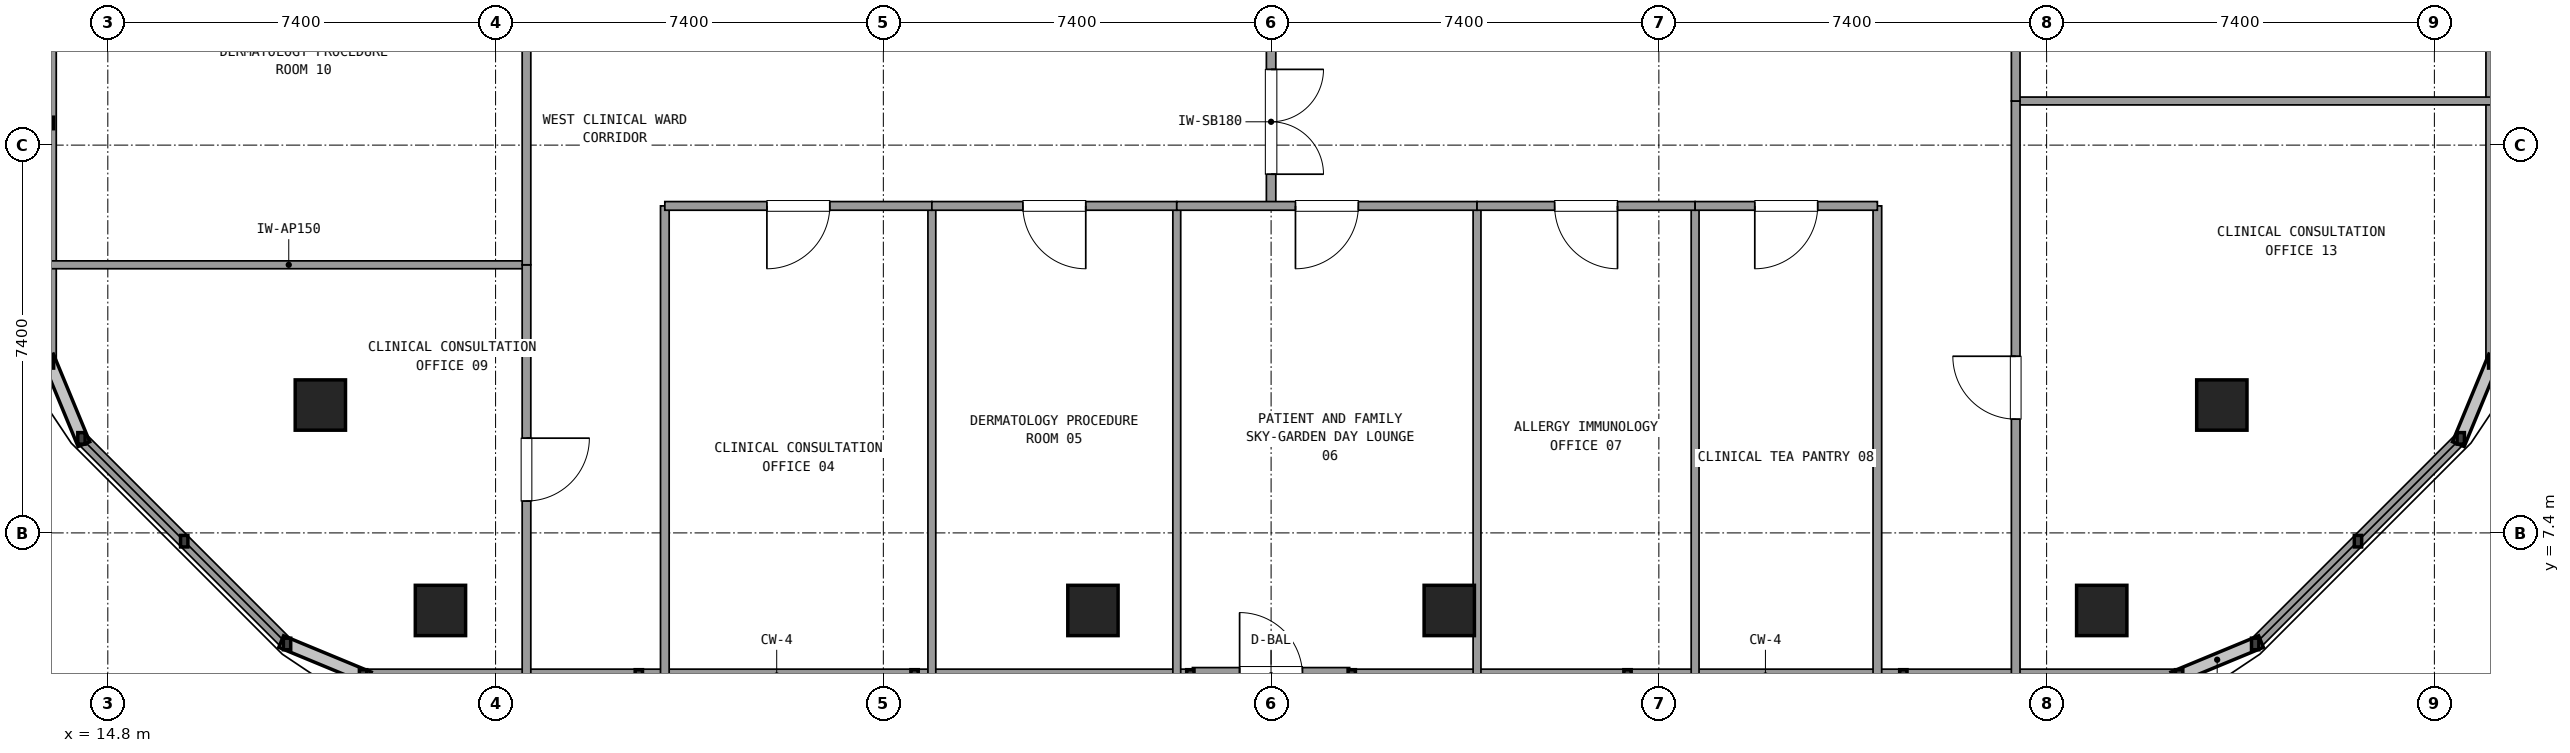
"""IFC4 building model, lengths in metres.
Left out: names, types, materials, properties, quantities, classifications, styles, units other than length and angle.
Written with IfcOpenShell. Run it as: python <this file> out.ifc"""

import sys

from ifc_helpers import new_model, si_unit, direction, frame, frame_2d, origin, origin_2d, place, context, subcontext, project, spatial, rectangle, extrude, element, fill, save


model = new_model("IFC4")
c1 = context("Model", 3, precision=1e-05, world=origin(), true_north=direction((0.0, 1.0)))
c2 = subcontext(c1, "Body", "Model", "MODEL_VIEW")
j1 = project(units=[si_unit("LENGTHUNIT", "METRE"), si_unit("PLANEANGLEUNIT", "RADIAN")], contexts=[c1])
p1 = place(None, origin())
s1 = spatial("IfcSite", under=j1, at=p1, CompositionType="ELEMENT")
p2 = place(p1, origin())
s2 = spatial("IfcBuilding", under=s1, at=p2, CompositionType="ELEMENT")
p3 = place(p2, frame((0.0, 0.0, 149.22)))
s3 = spatial("IfcBuildingStorey", under=s2, at=p3, CompositionType="ELEMENT", Elevation=149.22)
for number, where, z_axis, x_axis in (
    (1, (18.856, 9.84, 0.0), (0.0, 0.0, 1.0), (1.0, 0.0, 0.0)),
    (2, (21.148, 5.92, 0.0), (0.0, 0.0, 1.0), (1.0, 0.0, 0.0)),
    (3, (33.6, 5.92, 0.0), (0.0, 0.0, 1.0), (1.0, 0.0, 0.0)),
    (4, (40.4, 5.92, 0.0), (0.0, 0.0, 1.0), (1.0, 0.0, 0.0)),
    (5, (52.852, 5.92, 0.0), (0.0, 0.0, 1.0), (1.0, 0.0, 0.0)),
    (6, (55.144, 9.84, 0.0), (0.0, 0.0, 1.0), (1.0, 0.0, 0.0)),
):
    element("IfcColumn", number, at=place(p3, frame(where, z_axis=z_axis, x_axis=x_axis)), inside=s3, PredefinedType="COLUMN", context=c2, shape_type="SweptSolid", body=[
        extrude(rectangle(XDim=0.96, YDim=0.96, at=origin_2d()), origin(), (0.0, 0.0, 1.0), 3.6),
    ])
p4 = place(p3, frame((35.499, 4.68, 0.0), z_axis=(0.0, 0.0, 1.0), x_axis=(1.0, 0.0, 0.0)))
e7 = element("IfcWall", 7, at=p4, inside=s3, PredefinedType="SOLIDWALL", context=c2, shape_type="SweptSolid", body=[
    extrude(rectangle(XDim=3.0, YDim=0.3, at=frame_2d((1.5, 0.0))), origin(), (0.0, 0.0, 1.0), 2.67),
])
p5 = place(p4, frame((0.9, 0.0, 0.0)))
e8 = element("IfcOpeningElement", 8, at=p5, cuts=e7, PredefinedType="OPENING", context=c2, shape_type="SweptSolid", body=[
    extrude(rectangle(XDim=1.2, YDim=2.2, at=frame_2d((0.6, 1.1))), frame((0.0, 0.16, 0.0), z_axis=(0.0, -1.0, 0.0), x_axis=(1.0, 0.0, 0.0)), (0.0, 0.0, 1.0), 0.32),
])
p6 = place(p3, frame((19.671, 4.68, 0.0), z_axis=(0.0, 0.0, 1.0), x_axis=(1.0, 0.0, 0.0)))
e9 = element("IfcWall", 9, at=p6, inside=s3, PredefinedType="SOLIDWALL", context=c2, shape_type="SweptSolid", body=[
    extrude(rectangle(XDim=15.788, YDim=0.24, at=frame_2d((7.894, 0.0))), origin(), (0.0, 0.0, 1.0), 0.85),
])
p7 = place(p3, frame((38.539, 4.68, 0.0), z_axis=(0.0, 0.0, 1.0), x_axis=(1.0, 0.0, 0.0)))
e10 = element("IfcWall", 10, at=p7, inside=s3, PredefinedType="SOLIDWALL", context=c2, shape_type="SweptSolid", body=[
    extrude(rectangle(XDim=15.79, YDim=0.24, at=frame_2d((7.895, 0.0))), origin(), (0.0, 0.0, 1.0), 0.85),
])
p8 = place(p3, frame((55.78, 5.281, 0.0), z_axis=(0.0, 0.0, 1.0), x_axis=(0.707084777957, 0.707128783731, 0.0)))
e11 = element("IfcWall", 11, at=p8, inside=s3, PredefinedType="SOLIDWALL", context=c2, shape_type="SweptSolid", body=[
    extrude(rectangle(XDim=5.548, YDim=0.24, at=frame_2d((2.774, 0.0))), origin(), (0.0, 0.0, 1.0), 0.85),
])
p9 = place(p3, frame((60.304, 10.655, 0.0), z_axis=(0.0, 0.0, 1.0), x_axis=(0.0, 1.0, 0.0)))
e12 = element("IfcWall", 12, at=p9, inside=s3, PredefinedType="SOLIDWALL", context=c2, shape_type="SweptSolid", body=[
    extrude(rectangle(XDim=30.49, YDim=0.24, at=frame_2d((15.245, 0.0))), origin(), (0.0, 0.0, 1.0), 0.85),
])
p10 = place(p3, frame((13.696, 24.36, 0.0), z_axis=(0.0, 0.0, 1.0), x_axis=(0.0, -1.0, 0.0)))
e13 = element("IfcWall", 13, at=p10, inside=s3, PredefinedType="SOLIDWALL", context=c2, shape_type="SweptSolid", body=[
    extrude(rectangle(XDim=13.705, YDim=0.24, at=frame_2d((6.853, 0.0))), origin(), (0.0, 0.0, 1.0), 0.85),
])
p11 = place(p3, frame((14.297, 9.204, 0.0), z_axis=(0.0, 0.0, 1.0), x_axis=(0.707084777957, -0.707128783731, 0.0)))
e14 = element("IfcWall", 14, at=p11, inside=s3, PredefinedType="SOLIDWALL", context=c2, shape_type="SweptSolid", body=[
    extrude(rectangle(XDim=5.548, YDim=0.24, at=frame_2d((2.774, 0.0))), origin(), (0.0, 0.0, 1.0), 0.85),
])
p12 = place(p3, frame((37.0, 13.64, 0.0), z_axis=(0.0, 0.0, 1.0), x_axis=(0.0, 1.0, 0.0)))
e15 = element("IfcWall", 15, at=p12, inside=s3, PredefinedType="PARTITIONING", context=c2, shape_type="SweptSolid", body=[
    extrude(rectangle(XDim=3.21, YDim=0.18, at=frame_2d((1.605, 0.0))), origin(), (0.0, 0.0, 1.0), 2.61),
])
p13 = place(p12, frame((0.605, 0.0, 0.0)))
e16 = element("IfcOpeningElement", 16, at=p13, cuts=e15, PredefinedType="OPENING", context=c2, shape_type="SweptSolid", body=[
    extrude(rectangle(XDim=2.0, YDim=2.2, at=frame_2d((1.0, 1.1))), frame((0.0, 0.1, 0.0), z_axis=(0.0, -1.0, 0.0), x_axis=(1.0, 0.0, 0.0)), (0.0, 0.0, 1.0), 0.2),
])
for number, where, z_axis, x_axis in (
    (17, (25.43, 4.7, 0.0), (0.0, 0.0, 1.0), (0.0, 1.0, 0.0)),
    (18, (48.57, 4.7, 0.0), (0.0, 0.0, 1.0), (0.0, 1.0, 0.0)),
):
    element("IfcWall", number, at=place(p3, frame(where, z_axis=z_axis, x_axis=x_axis)), inside=s3, PredefinedType="PARTITIONING", context=c2, shape_type="SweptSolid", body=[
        extrude(rectangle(XDim=8.94, YDim=0.165, at=frame_2d((4.47, 0.0))), origin(), (0.0, 0.0, 1.0), 2.61),
    ])
p14 = place(p3, frame((30.526, 13.64, 0.0), z_axis=(0.0, 0.0, 1.0), x_axis=(0.0, -1.0, 0.0)))
e19 = element("IfcWall", 19, at=p14, inside=s3, PredefinedType="PARTITIONING", context=c2, shape_type="SweptSolid", body=[
    extrude(rectangle(XDim=8.94, YDim=0.15, at=frame_2d((4.47, 0.0))), origin(), (0.0, 0.0, 1.0), 2.61),
])
p15 = place(p3, frame((25.43, 13.64, 0.0), z_axis=(0.0, 0.0, 1.0), x_axis=(1.0, 0.0, 0.0)))
e20 = element("IfcWall", 20, at=p15, inside=s3, PredefinedType="PARTITIONING", context=c2, shape_type="SweptSolid", body=[
    extrude(rectangle(XDim=5.096, YDim=0.165, at=frame_2d((2.548, 0.0))), origin(), (0.0, 0.0, 1.0), 2.61),
])
p16 = place(p15, frame((1.948, 0.0, 0.0)))
e21 = element("IfcOpeningElement", 21, at=p16, cuts=e20, PredefinedType="OPENING", context=c2, shape_type="SweptSolid", body=[
    extrude(rectangle(XDim=1.2, YDim=2.15, at=frame_2d((0.6, 1.075))), frame((0.0, 0.093, 0.0), z_axis=(0.0, -1.0, 0.0), x_axis=(1.0, 0.0, 0.0)), (0.0, 0.0, 1.0), 0.185),
])
p17 = place(p3, frame((35.2, 13.64, 0.0), z_axis=(0.0, 0.0, 1.0), x_axis=(0.0, -1.0, 0.0)))
e22 = element("IfcWall", 22, at=p17, inside=s3, PredefinedType="PARTITIONING", context=c2, shape_type="SweptSolid", body=[
    extrude(rectangle(XDim=8.94, YDim=0.15, at=frame_2d((4.47, 0.0))), origin(), (0.0, 0.0, 1.0), 2.61),
])
p18 = place(p3, frame((30.526, 13.64, 0.0), z_axis=(0.0, 0.0, 1.0), x_axis=(1.0, 0.0, 0.0)))
e23 = element("IfcWall", 23, at=p18, inside=s3, PredefinedType="PARTITIONING", context=c2, shape_type="SweptSolid", body=[
    extrude(rectangle(XDim=4.674, YDim=0.165, at=frame_2d((2.337, 0.0))), origin(), (0.0, 0.0, 1.0), 2.61),
])
p19 = place(p18, frame((1.737, 0.0, 0.0)))
e24 = element("IfcOpeningElement", 24, at=p19, cuts=e23, PredefinedType="OPENING", context=c2, shape_type="SweptSolid", body=[
    extrude(rectangle(XDim=1.2, YDim=2.15, at=frame_2d((0.6, 1.075))), frame((0.0, 0.093, 0.0), z_axis=(0.0, -1.0, 0.0), x_axis=(1.0, 0.0, 0.0)), (0.0, 0.0, 1.0), 0.185),
])
p20 = place(p3, frame((40.93, 13.64, 0.0), z_axis=(0.0, 0.0, 1.0), x_axis=(0.0, -1.0, 0.0)))
e25 = element("IfcWall", 25, at=p20, inside=s3, PredefinedType="PARTITIONING", context=c2, shape_type="SweptSolid", body=[
    extrude(rectangle(XDim=8.94, YDim=0.15, at=frame_2d((4.47, 0.0))), origin(), (0.0, 0.0, 1.0), 2.61),
])
p21 = place(p3, frame((35.2, 13.64, 0.0), z_axis=(0.0, 0.0, 1.0), x_axis=(1.0, 0.0, 0.0)))
e26 = element("IfcWall", 26, at=p21, inside=s3, PredefinedType="PARTITIONING", context=c2, shape_type="SweptSolid", body=[
    extrude(rectangle(XDim=5.73, YDim=0.165, at=frame_2d((2.865, 0.0))), origin(), (0.0, 0.0, 1.0), 2.61),
])
p22 = place(p21, frame((2.265, 0.0, 0.0)))
e27 = element("IfcOpeningElement", 27, at=p22, cuts=e26, PredefinedType="OPENING", context=c2, shape_type="SweptSolid", body=[
    extrude(rectangle(XDim=1.2, YDim=2.15, at=frame_2d((0.6, 1.075))), frame((0.0, 0.093, 0.0), z_axis=(0.0, -1.0, 0.0), x_axis=(1.0, 0.0, 0.0)), (0.0, 0.0, 1.0), 0.185),
])
p23 = place(p3, frame((45.092, 13.64, 0.0), z_axis=(0.0, 0.0, 1.0), x_axis=(0.0, -1.0, 0.0)))
e28 = element("IfcWall", 28, at=p23, inside=s3, PredefinedType="PARTITIONING", context=c2, shape_type="SweptSolid", body=[
    extrude(rectangle(XDim=8.94, YDim=0.15, at=frame_2d((4.47, 0.0))), origin(), (0.0, 0.0, 1.0), 2.61),
])
p24 = place(p3, frame((40.93, 13.64, 0.0), z_axis=(0.0, 0.0, 1.0), x_axis=(1.0, 0.0, 0.0)))
e29 = element("IfcWall", 29, at=p24, inside=s3, PredefinedType="PARTITIONING", context=c2, shape_type="SweptSolid", body=[
    extrude(rectangle(XDim=4.162, YDim=0.165, at=frame_2d((2.081, 0.0))), origin(), (0.0, 0.0, 1.0), 2.61),
])
p25 = place(p24, frame((1.481, 0.0, 0.0)))
e30 = element("IfcOpeningElement", 30, at=p25, cuts=e29, PredefinedType="OPENING", context=c2, shape_type="SweptSolid", body=[
    extrude(rectangle(XDim=1.2, YDim=2.15, at=frame_2d((0.6, 1.075))), frame((0.0, 0.093, 0.0), z_axis=(0.0, -1.0, 0.0), x_axis=(1.0, 0.0, 0.0)), (0.0, 0.0, 1.0), 0.185),
])
p26 = place(p3, frame((45.092, 13.64, 0.0), z_axis=(0.0, 0.0, 1.0), x_axis=(1.0, 0.0, 0.0)))
e31 = element("IfcWall", 31, at=p26, inside=s3, PredefinedType="PARTITIONING", context=c2, shape_type="SweptSolid", body=[
    extrude(rectangle(XDim=3.478, YDim=0.165, at=frame_2d((1.739, 0.0))), origin(), (0.0, 0.0, 1.0), 2.61),
])
p27 = place(p26, frame((1.139, 0.0, 0.0)))
e32 = element("IfcOpeningElement", 32, at=p27, cuts=e31, PredefinedType="OPENING", context=c2, shape_type="SweptSolid", body=[
    extrude(rectangle(XDim=1.2, YDim=2.15, at=frame_2d((0.6, 1.075))), frame((0.0, 0.093, 0.0), z_axis=(0.0, -1.0, 0.0), x_axis=(1.0, 0.0, 0.0)), (0.0, 0.0, 1.0), 0.185),
])
p28 = place(p3, frame((22.79, 12.516, 0.0), z_axis=(0.0, 0.0, 1.0), x_axis=(-1.0, 0.0, 0.0)))
e33 = element("IfcWall", 33, at=p28, inside=s3, PredefinedType="PARTITIONING", context=c2, shape_type="SweptSolid", body=[
    extrude(rectangle(XDim=9.074, YDim=0.15, at=frame_2d((4.537, 0.0))), origin(), (0.0, 0.0, 1.0), 2.61),
])
p29 = place(p3, frame((22.79, 4.7, 0.0), z_axis=(0.0, 0.0, 1.0), x_axis=(0.0, 1.0, 0.0)))
e34 = element("IfcWall", 34, at=p29, inside=s3, PredefinedType="PARTITIONING", context=c2, shape_type="SweptSolid", body=[
    extrude(rectangle(XDim=7.816, YDim=0.165, at=frame_2d((3.908, 0.0))), origin(), (0.0, 0.0, 1.0), 2.61),
])
p30 = place(p29, frame((3.308, 0.0, 0.0)))
e35 = element("IfcOpeningElement", 35, at=p30, cuts=e34, PredefinedType="OPENING", context=c2, shape_type="SweptSolid", body=[
    extrude(rectangle(XDim=1.2, YDim=2.15, at=frame_2d((0.6, 1.075))), frame((0.0, 0.093, 0.0), z_axis=(0.0, -1.0, 0.0), x_axis=(1.0, 0.0, 0.0)), (0.0, 0.0, 1.0), 0.185),
])
p31 = place(p3, frame((22.79, 12.516, 0.0), z_axis=(0.0, 0.0, 1.0), x_axis=(0.0, 1.0, 0.0)))
e36 = element("IfcWall", 36, at=p31, inside=s3, PredefinedType="PARTITIONING", context=c2, shape_type="SweptSolid", body=[
    extrude(rectangle(XDim=11.724, YDim=0.165, at=frame_2d((5.862, 0.0))), origin(), (0.0, 0.0, 1.0), 2.61),
])
p32 = place(p31, frame((5.262, 0.0, 0.0)))
e37 = element("IfcOpeningElement", 37, at=p32, cuts=e36, PredefinedType="OPENING", context=c2, shape_type="SweptSolid", body=[
    extrude(rectangle(XDim=1.2, YDim=2.15, at=frame_2d((0.6, 1.075))), frame((0.0, 0.093, 0.0), z_axis=(0.0, -1.0, 0.0), x_axis=(1.0, 0.0, 0.0)), (0.0, 0.0, 1.0), 0.185),
])
p33 = place(p3, frame((51.21, 15.642, 0.0), z_axis=(0.0, 0.0, 1.0), x_axis=(1.0, 0.0, 0.0)))
e38 = element("IfcWall", 38, at=p33, inside=s3, PredefinedType="PARTITIONING", context=c2, shape_type="SweptSolid", body=[
    extrude(rectangle(XDim=9.074, YDim=0.15, at=frame_2d((4.537, 0.0))), origin(), (0.0, 0.0, 1.0), 2.61),
])
p34 = place(p3, frame((51.21, 4.7, 0.0), z_axis=(0.0, 0.0, 1.0), x_axis=(0.0, 1.0, 0.0)))
e39 = element("IfcWall", 39, at=p34, inside=s3, PredefinedType="PARTITIONING", context=c2, shape_type="SweptSolid", body=[
    extrude(rectangle(XDim=10.942, YDim=0.165, at=frame_2d((5.471, 0.0))), origin(), (0.0, 0.0, 1.0), 2.61),
])
p35 = place(p34, frame((4.871, 0.0, 0.0)))
e40 = element("IfcOpeningElement", 40, at=p35, cuts=e39, PredefinedType="OPENING", context=c2, shape_type="SweptSolid", body=[
    extrude(rectangle(XDim=1.2, YDim=2.15, at=frame_2d((0.6, 1.075))), frame((0.0, 0.093, 0.0), z_axis=(0.0, -1.0, 0.0), x_axis=(1.0, 0.0, 0.0)), (0.0, 0.0, 1.0), 0.185),
])
p36 = place(p3, frame((51.21, 15.642, 0.0), z_axis=(0.0, 0.0, 1.0), x_axis=(0.0, 1.0, 0.0)))
e41 = element("IfcWall", 41, at=p36, inside=s3, PredefinedType="PARTITIONING", context=c2, shape_type="SweptSolid", body=[
    extrude(rectangle(XDim=8.598, YDim=0.165, at=frame_2d((4.299, 0.0))), origin(), (0.0, 0.0, 1.0), 2.61),
])
p37 = place(p36, frame((3.699, 0.0, 0.0)))
e42 = element("IfcOpeningElement", 42, at=p37, cuts=e41, PredefinedType="OPENING", context=c2, shape_type="SweptSolid", body=[
    extrude(rectangle(XDim=1.2, YDim=2.15, at=frame_2d((0.6, 1.075))), frame((0.0, 0.093, 0.0), z_axis=(0.0, -1.0, 0.0), x_axis=(1.0, 0.0, 0.0)), (0.0, 0.0, 1.0), 0.185),
])
p38 = place(p13, frame((2.0, 0.0, 0.0), z_axis=(0.0, 0.0, 1.0), x_axis=(-1.0, 0.0, 0.0)))
e43 = element("IfcDoor", 43, at=p38, inside=s3, OperationType="DOUBLE_DOOR_SINGLE_SWING", PredefinedType="DOOR", context=c2, shape_type="SweptSolid", body=[
    extrude(rectangle(XDim=2.0, YDim=2.2, at=frame_2d((1.0, 1.1))), frame((0.0, 0.025, 0.0), z_axis=(0.0, -1.0, 0.0), x_axis=(1.0, 0.0, 0.0)), (0.0, 0.0, 1.0), 0.05),
])
fill(e16, e43)
p39 = place(p16, frame((1.2, 0.0, 0.0), z_axis=(0.0, 0.0, 1.0), x_axis=(-1.0, 0.0, 0.0)))
e44 = element("IfcDoor", 44, at=p39, inside=s3, OperationType="SINGLE_SWING_LEFT", PredefinedType="DOOR", context=c2, shape_type="SweptSolid", body=[
    extrude(rectangle(XDim=1.2, YDim=2.15, at=frame_2d((0.6, 1.075))), frame((0.0, 0.025, 0.0), z_axis=(0.0, -1.0, 0.0), x_axis=(1.0, 0.0, 0.0)), (0.0, 0.0, 1.0), 0.05),
])
fill(e21, e44)
p40 = place(p19, frame((1.2, 0.0, 0.0), z_axis=(0.0, 0.0, 1.0), x_axis=(-1.0, 0.0, 0.0)))
e45 = element("IfcDoor", 45, at=p40, inside=s3, OperationType="SINGLE_SWING_RIGHT", PredefinedType="DOOR", context=c2, shape_type="SweptSolid", body=[
    extrude(rectangle(XDim=1.2, YDim=2.15, at=frame_2d((0.6, 1.075))), frame((0.0, 0.025, 0.0), z_axis=(0.0, -1.0, 0.0), x_axis=(1.0, 0.0, 0.0)), (0.0, 0.0, 1.0), 0.05),
])
fill(e24, e45)
p41 = place(p22, frame((1.2, 0.0, 0.0), z_axis=(0.0, 0.0, 1.0), x_axis=(-1.0, 0.0, 0.0)))
e46 = element("IfcDoor", 46, at=p41, inside=s3, OperationType="SINGLE_SWING_LEFT", PredefinedType="DOOR", context=c2, shape_type="SweptSolid", body=[
    extrude(rectangle(XDim=1.2, YDim=2.15, at=frame_2d((0.6, 1.075))), frame((0.0, 0.025, 0.0), z_axis=(0.0, -1.0, 0.0), x_axis=(1.0, 0.0, 0.0)), (0.0, 0.0, 1.0), 0.05),
])
fill(e27, e46)
p42 = place(p25, frame((1.2, 0.0, 0.0), z_axis=(0.0, 0.0, 1.0), x_axis=(-1.0, 0.0, 0.0)))
e47 = element("IfcDoor", 47, at=p42, inside=s3, OperationType="SINGLE_SWING_RIGHT", PredefinedType="DOOR", context=c2, shape_type="SweptSolid", body=[
    extrude(rectangle(XDim=1.2, YDim=2.15, at=frame_2d((0.6, 1.075))), frame((0.0, 0.025, 0.0), z_axis=(0.0, -1.0, 0.0), x_axis=(1.0, 0.0, 0.0)), (0.0, 0.0, 1.0), 0.05),
])
fill(e30, e47)
p43 = place(p27, frame((1.2, 0.0, 0.0), z_axis=(0.0, 0.0, 1.0), x_axis=(-1.0, 0.0, 0.0)))
e48 = element("IfcDoor", 48, at=p43, inside=s3, OperationType="SINGLE_SWING_LEFT", PredefinedType="DOOR", context=c2, shape_type="SweptSolid", body=[
    extrude(rectangle(XDim=1.2, YDim=2.15, at=frame_2d((0.6, 1.075))), frame((0.0, 0.025, 0.0), z_axis=(0.0, -1.0, 0.0), x_axis=(1.0, 0.0, 0.0)), (0.0, 0.0, 1.0), 0.05),
])
fill(e32, e48)
p44 = place(p30, frame((1.2, 0.0, 0.0), z_axis=(0.0, 0.0, 1.0), x_axis=(-1.0, 0.0, 0.0)))
e49 = element("IfcDoor", 49, at=p44, inside=s3, OperationType="SINGLE_SWING_RIGHT", PredefinedType="DOOR", context=c2, shape_type="SweptSolid", body=[
    extrude(rectangle(XDim=1.2, YDim=2.15, at=frame_2d((0.6, 1.075))), frame((0.0, 0.025, 0.0), z_axis=(0.0, -1.0, 0.0), x_axis=(1.0, 0.0, 0.0)), (0.0, 0.0, 1.0), 0.05),
])
fill(e35, e49)
p45 = place(p35, origin())
e50 = element("IfcDoor", 50, at=p45, inside=s3, OperationType="SINGLE_SWING_RIGHT", PredefinedType="DOOR", context=c2, shape_type="SweptSolid", body=[
    extrude(rectangle(XDim=1.2, YDim=2.15, at=frame_2d((0.6, 1.075))), frame((0.0, 0.025, 0.0), z_axis=(0.0, -1.0, 0.0), x_axis=(1.0, 0.0, 0.0)), (0.0, 0.0, 1.0), 0.05),
])
fill(e40, e50)
save(model, sys.argv[1])
